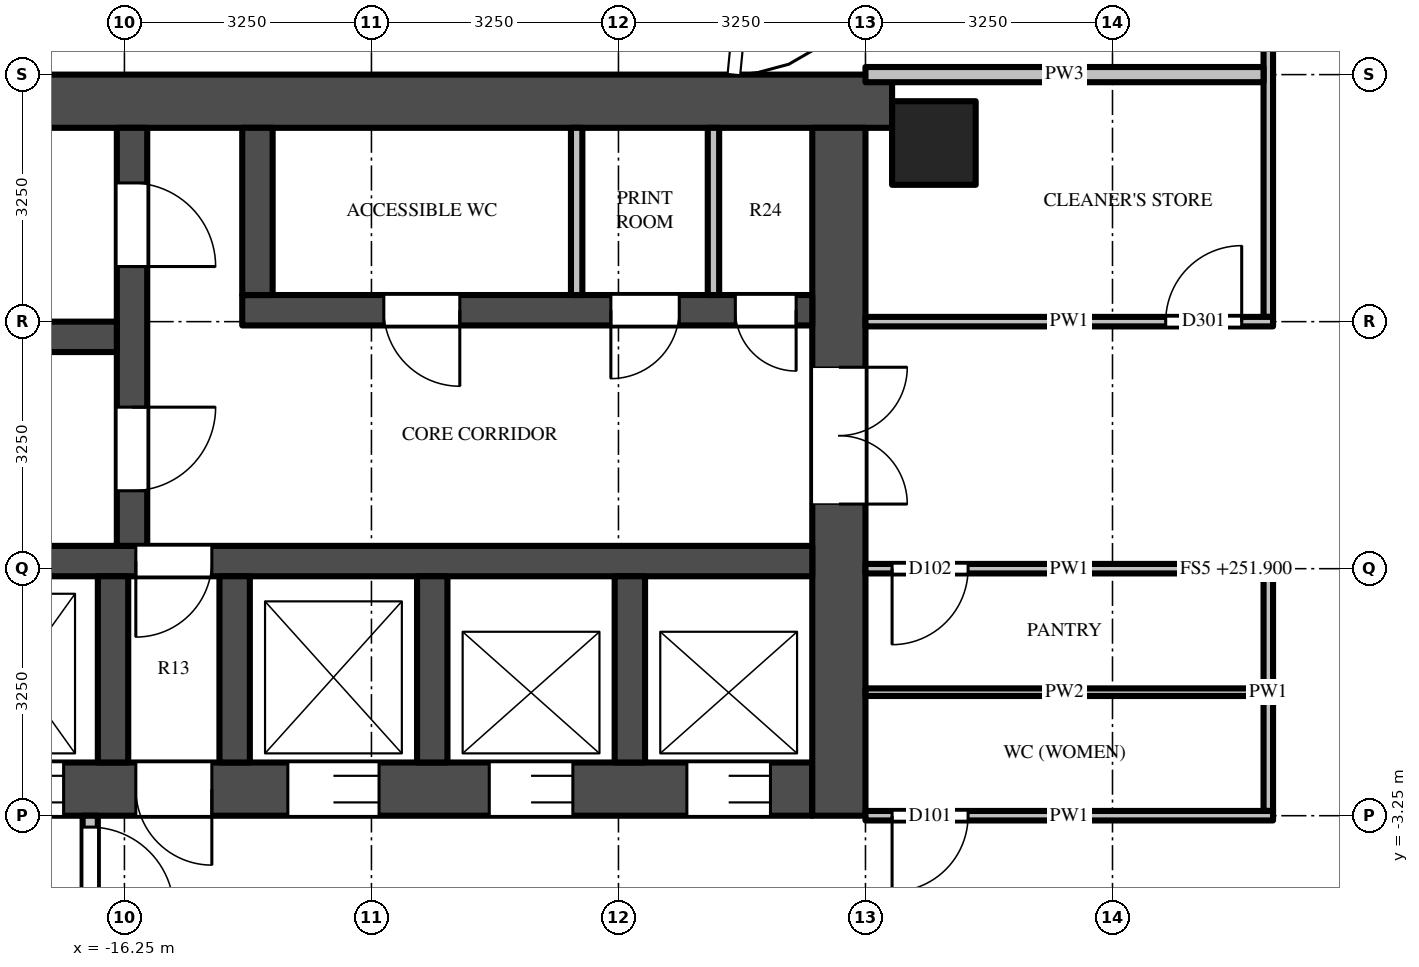
"""IFC4 building model, lengths in metres.
Left out: names, types, materials, properties, quantities, classifications, styles, units other than length and angle.
Written with IfcOpenShell. Run it as: python <this file> out.ifc"""

import sys

from ifc_helpers import new_model, si_unit, direction, frame, frame_2d, origin, origin_2d, place, context, subcontext, project, spatial, rectangle, extrude, source, transform, mapped, element, fill, save


model = new_model("IFC4")
c1 = context("Model", 3, precision=1e-05, world=origin(), true_north=direction((0.0, 1.0)))
c2 = subcontext(c1, "Body", "Model", "MODEL_VIEW")
j1 = project(units=[si_unit("LENGTHUNIT", "METRE"), si_unit("PLANEANGLEUNIT", "RADIAN")], contexts=[c1])
p1 = place(None, origin())
s1 = spatial("IfcSite", under=j1, at=p1, CompositionType="ELEMENT")
p2 = place(p1, origin())
s2 = spatial("IfcBuilding", under=s1, at=p2, CompositionType="ELEMENT")
p3 = place(p2, frame((0.0, 0.0, 251.9)))
s3 = spatial("IfcBuildingStorey", under=s2, at=p3, CompositionType="ELEMENT", Elevation=251.9)
m1 = source(origin(), c2, "Body", "SweptSolid", [
    extrude(rectangle(XDim=1.1, YDim=1.1, at=origin_2d()), origin(), (0.0, 0.0, 1.0), 3.9),
])
p4 = place(p3, frame((-5.6, 5.6, 0.0), z_axis=(0.0, 0.0, 1.0), x_axis=(1.0, 0.0, 0.0)))
e1 = element("IfcColumn", 1, at=p4, inside=s3, PredefinedType="COLUMN", context=c2, shape_type="MappedRepresentation", body=[
    mapped(m1, transform((0.0, 0.0, 0.0))),
])
m2 = source(origin(), c2, "Body", "SweptSolid", [
    extrude(rectangle(XDim=16.6, YDim=0.7, at=frame_2d((8.3, 0.0))), origin(), (0.0, 0.0, 1.0), 3.7),
])
p5 = place(p3, frame((-6.15, 6.15, 0.0), z_axis=(0.0, 0.0, 1.0), x_axis=(-1.0, 0.0, 0.0)))
e2 = element("IfcWall", 2, at=p5, inside=s3, PredefinedType="SHEAR", context=c2, shape_type="MappedRepresentation", body=[
    mapped(m2, transform((0.0, 0.0, 0.0))),
])
m3 = source(origin(), c2, "Body", "SweptSolid", [
    extrude(rectangle(XDim=14.85, YDim=0.7, at=frame_2d((7.425, 0.0))), origin(), (0.0, 0.0, 1.0), 3.7),
])
p6 = place(p3, frame((-7.2, -2.9, 0.0), z_axis=(0.0, 0.0, 1.0), x_axis=(-1.0, 0.0, 0.0)))
e3 = element("IfcWall", 3, at=p6, inside=s3, PredefinedType="SHEAR", context=c2, shape_type="MappedRepresentation", body=[
    mapped(m3, transform((0.0, 0.0, 0.0))),
])
m4 = source(origin(), c2, "Body", "SweptSolid", [
    extrude(rectangle(XDim=1.1, YDim=2.1, at=frame_2d((0.55, 1.05))), frame((0.0, 0.36, 0.0), z_axis=(0.0, -1.0, 0.0), x_axis=(1.0, 0.0, 0.0)), (0.0, 0.0, 1.0), 0.72),
])
p7 = place(p6, frame((0.55, 0.0, 0.0)))
e4 = element("IfcOpeningElement", 4, at=p7, cuts=e3, PredefinedType="OPENING", context=c2, shape_type="MappedRepresentation", body=[
    mapped(m4, transform((0.0, 0.0, 0.0))),
])
p8 = place(p6, frame((3.15, 0.0, 0.0)))
e5 = element("IfcOpeningElement", 5, at=p8, cuts=e3, PredefinedType="OPENING", context=c2, shape_type="MappedRepresentation", body=[
    mapped(m4, transform((0.0, 0.0, 0.0))),
])
m5 = source(origin(), c2, "Body", "SweptSolid", [
    extrude(rectangle(XDim=1.2, YDim=2.1, at=frame_2d((0.6, 1.05))), frame((0.0, 0.36, 0.0), z_axis=(0.0, -1.0, 0.0), x_axis=(1.0, 0.0, 0.0)), (0.0, 0.0, 1.0), 0.72),
])
p9 = place(p6, frame((5.7, 0.0, 0.0)))
e6 = element("IfcOpeningElement", 6, at=p9, cuts=e3, PredefinedType="OPENING", context=c2, shape_type="MappedRepresentation", body=[
    mapped(m5, transform((0.0, 0.0, 0.0))),
])
m6 = source(origin(), c2, "Body", "SweptSolid", [
    extrude(rectangle(XDim=1.3, YDim=2.1, at=frame_2d((0.65, 1.05))), frame((0.0, 0.36, 0.0), z_axis=(0.0, -1.0, 0.0), x_axis=(1.0, 0.0, 0.0)), (0.0, 0.0, 1.0), 0.72),
])
p10 = place(p6, frame((12.2, 0.0, 0.0)))
e7 = element("IfcOpeningElement", 7, at=p10, cuts=e3, PredefinedType="OPENING", context=c2, shape_type="MappedRepresentation", body=[
    mapped(m6, transform((0.0, 0.0, 0.0))),
])
p11 = place(p6, frame((9.85, 0.0, 0.0)))
e8 = element("IfcOpeningElement", 8, at=p11, cuts=e3, PredefinedType="OPENING", context=c2, shape_type="MappedRepresentation", body=[
    mapped(m5, transform((0.0, 0.0, 0.0))),
])
m7 = source(origin(), c2, "Body", "SweptSolid", [
    extrude(rectangle(XDim=1.0, YDim=2.1, at=frame_2d((0.5, 1.05))), frame((0.0, 0.36, 0.0), z_axis=(0.0, -1.0, 0.0), x_axis=(1.0, 0.0, 0.0)), (0.0, 0.0, 1.0), 0.72),
])
p12 = place(p6, frame((7.9, 0.0, 0.0)))
e9 = element("IfcOpeningElement", 9, at=p12, cuts=e3, PredefinedType="OPENING", context=c2, shape_type="MappedRepresentation", body=[
    mapped(m7, transform((0.0, 0.0, 0.0))),
])
m8 = source(origin(), c2, "Body", "SweptSolid", [
    extrude(rectangle(XDim=9.05, YDim=0.7, at=frame_2d((4.525, 0.0))), origin(), (0.0, 0.0, 1.0), 3.7),
])
p13 = place(p3, frame((-6.85, 5.8, 0.0), z_axis=(0.0, 0.0, 1.0), x_axis=(0.0, -1.0, 0.0)))
e10 = element("IfcWall", 10, at=p13, inside=s3, PredefinedType="SHEAR", context=c2, shape_type="MappedRepresentation", body=[
    mapped(m8, transform((0.0, 0.0, 0.0))),
])
m9 = source(origin(), c2, "Body", "SweptSolid", [
    extrude(rectangle(XDim=1.8, YDim=2.1, at=frame_2d((0.9, 1.05))), frame((0.0, 0.36, 0.0), z_axis=(0.0, -1.0, 0.0), x_axis=(1.0, 0.0, 0.0)), (0.0, 0.0, 1.0), 0.72),
])
p14 = place(p13, frame((3.15, 0.0, 0.0)))
e11 = element("IfcOpeningElement", 11, at=p14, cuts=e10, PredefinedType="OPENING", context=c2, shape_type="MappedRepresentation", body=[
    mapped(m9, transform((0.0, 0.0, 0.0))),
])
m10 = source(origin(), c2, "Body", "SweptSolid", [
    extrude(rectangle(XDim=7.5, YDim=0.4, at=frame_2d((3.75, 0.0))), origin(), (0.0, 0.0, 1.0), 3.7),
])
p15 = place(p3, frame((-7.2, 3.4, 0.0), z_axis=(0.0, 0.0, 1.0), x_axis=(-1.0, 0.0, 0.0)))
e12 = element("IfcWall", 12, at=p15, inside=s3, PredefinedType="SHEAR", context=c2, shape_type="MappedRepresentation", body=[
    mapped(m10, transform((0.0, 0.0, 0.0))),
])
m11 = source(origin(), c2, "Body", "SweptSolid", [
    extrude(rectangle(XDim=0.8, YDim=2.1, at=frame_2d((0.4, 1.05))), frame((0.0, 0.21, 0.0), z_axis=(0.0, -1.0, 0.0), x_axis=(1.0, 0.0, 0.0)), (0.0, 0.0, 1.0), 0.42),
])
p16 = place(p15, frame((0.212, 0.0, 0.0)))
e13 = element("IfcOpeningElement", 13, at=p16, cuts=e12, PredefinedType="OPENING", context=c2, shape_type="MappedRepresentation", body=[
    mapped(m11, transform((0.0, 0.0, 0.0))),
])
m12 = source(origin(), c2, "Body", "SweptSolid", [
    extrude(rectangle(XDim=0.9, YDim=2.1, at=frame_2d((0.45, 1.05))), frame((0.0, 0.21, 0.0), z_axis=(0.0, -1.0, 0.0), x_axis=(1.0, 0.0, 0.0)), (0.0, 0.0, 1.0), 0.42),
])
p17 = place(p15, frame((1.75, 0.0, 0.0)))
e14 = element("IfcOpeningElement", 14, at=p17, cuts=e12, PredefinedType="OPENING", context=c2, shape_type="MappedRepresentation", body=[
    mapped(m12, transform((0.0, 0.0, 0.0))),
])
m13 = source(origin(), c2, "Body", "SweptSolid", [
    extrude(rectangle(XDim=1.0, YDim=2.1, at=frame_2d((0.5, 1.05))), frame((0.0, 0.21, 0.0), z_axis=(0.0, -1.0, 0.0), x_axis=(1.0, 0.0, 0.0)), (0.0, 0.0, 1.0), 0.42),
])
p18 = place(p15, frame((4.637, 0.0, 0.0)))
e15 = element("IfcOpeningElement", 15, at=p18, cuts=e12, PredefinedType="OPENING", context=c2, shape_type="MappedRepresentation", body=[
    mapped(m13, transform((0.0, 0.0, 0.0))),
])
m14 = source(origin(), c2, "Body", "SweptSolid", [
    extrude(rectangle(XDim=14.85, YDim=0.4, at=frame_2d((7.425, 0.0))), origin(), (0.0, 0.0, 1.0), 3.7),
])
p19 = place(p3, frame((-7.2, 0.1, 0.0), z_axis=(0.0, 0.0, 1.0), x_axis=(-1.0, 0.0, 0.0)))
e16 = element("IfcWall", 16, at=p19, inside=s3, PredefinedType="SHEAR", context=c2, shape_type="MappedRepresentation", body=[
    mapped(m14, transform((0.0, 0.0, 0.0))),
])
p20 = place(p19, frame((7.9, 0.0, 0.0)))
e17 = element("IfcOpeningElement", 17, at=p20, cuts=e16, PredefinedType="OPENING", context=c2, shape_type="MappedRepresentation", body=[
    mapped(m13, transform((0.0, 0.0, 0.0))),
])
m15 = source(origin(), c2, "Body", "SweptSolid", [
    extrude(rectangle(XDim=5.5, YDim=0.4, at=frame_2d((2.75, 0.0))), origin(), (0.0, 0.0, 1.0), 3.7),
])
p21 = place(p3, frame((-16.15, 5.8, 0.0), z_axis=(0.0, 0.0, 1.0), x_axis=(0.0, -1.0, 0.0)))
e18 = element("IfcWall", 18, at=p21, inside=s3, PredefinedType="SHEAR", context=c2, shape_type="MappedRepresentation", body=[
    mapped(m15, transform((0.0, 0.0, 0.0))),
])
m16 = source(origin(), c2, "Body", "SweptSolid", [
    extrude(rectangle(XDim=1.1, YDim=2.1, at=frame_2d((0.55, 1.05))), frame((0.0, 0.21, 0.0), z_axis=(0.0, -1.0, 0.0), x_axis=(1.0, 0.0, 0.0)), (0.0, 0.0, 1.0), 0.42),
])
p22 = place(p21, frame((0.725, 0.0, 0.0)))
e19 = element("IfcOpeningElement", 19, at=p22, cuts=e18, PredefinedType="OPENING", context=c2, shape_type="MappedRepresentation", body=[
    mapped(m16, transform((0.0, 0.0, 0.0))),
])
p23 = place(p21, frame((3.675, 0.0, 0.0)))
e20 = element("IfcOpeningElement", 20, at=p23, cuts=e18, PredefinedType="OPENING", context=c2, shape_type="MappedRepresentation", body=[
    mapped(m16, transform((0.0, 0.0, 0.0))),
])
m17 = source(origin(), c2, "Body", "SweptSolid", [
    extrude(rectangle(XDim=5.7, YDim=0.4, at=frame_2d((2.85, 0.0))), origin(), (0.0, 0.0, 1.0), 3.7),
])
p24 = place(p3, frame((-16.35, 3.05, 0.0), z_axis=(0.0, 0.0, 1.0), x_axis=(-1.0, 0.0, 0.0)))
e21 = element("IfcWall", 21, at=p24, inside=s3, PredefinedType="SHEAR", context=c2, shape_type="MappedRepresentation", body=[
    mapped(m17, transform((0.0, 0.0, 0.0))),
])
m18 = source(origin(), c2, "Body", "SweptSolid", [
    extrude(rectangle(XDim=2.2, YDim=0.4, at=frame_2d((1.1, 0.0))), origin(), (0.0, 0.0, 1.0), 3.7),
])
p25 = place(p3, frame((-14.5, 5.8, 0.0), z_axis=(0.0, 0.0, 1.0), x_axis=(0.0, -1.0, 0.0)))
e22 = element("IfcWall", 22, at=p25, inside=s3, PredefinedType="SHEAR", context=c2, shape_type="MappedRepresentation", body=[
    mapped(m18, transform((0.0, 0.0, 0.0))),
])
m19 = source(origin(), c2, "Body", "SweptSolid", [
    extrude(rectangle(XDim=2.45, YDim=0.4, at=frame_2d((1.225, 0.0))), origin(), (0.0, 0.0, 1.0), 3.7),
])
for number, where, z_axis, x_axis in (
    (23, (-9.6, -0.1, 0.0), (0.0, 0.0, 1.0), (0.0, -1.0, 0.0)),
    (24, (-12.2, -0.1, 0.0), (0.0, 0.0, 1.0), (0.0, -1.0, 0.0)),
    (25, (-14.8, -0.1, 0.0), (0.0, 0.0, 1.0), (0.0, -1.0, 0.0)),
    (26, (-16.4, -0.1, 0.0), (0.0, 0.0, 1.0), (0.0, -1.0, 0.0)),
):
    element("IfcWall", number, at=place(p3, frame(where, z_axis=z_axis, x_axis=x_axis)), inside=s3, PredefinedType="SHEAR", context=c2, shape_type="MappedRepresentation", body=[
        mapped(m19, transform((0.0, 0.0, 0.0))),
    ])
m20 = source(origin(), c2, "Body", "SweptSolid", [
    extrude(rectangle(XDim=3.25, YDim=0.2, at=frame_2d((1.625, 0.0))), origin(), (0.0, 0.0, 1.0), 3.7),
])
p26 = place(p3, frame((-16.7, -3.25, 0.0), z_axis=(0.0, 0.0, 1.0), x_axis=(0.0, -1.0, 0.0)))
e27 = element("IfcWall", 27, at=p26, inside=s3, PredefinedType="PARTITIONING", context=c2, shape_type="MappedRepresentation", body=[
    mapped(m20, transform((0.0, 0.0, 0.0))),
])
m21 = source(origin(), c2, "Body", "SweptSolid", [
    extrude(rectangle(XDim=1.1, YDim=2.1, at=frame_2d((0.55, 1.05))), frame((0.0, 0.11, 0.0), z_axis=(0.0, -1.0, 0.0), x_axis=(1.0, 0.0, 0.0)), (0.0, 0.0, 1.0), 0.22),
])
p27 = place(p26, frame((0.15, 0.0, 0.0)))
e28 = element("IfcOpeningElement", 28, at=p27, cuts=e27, PredefinedType="OPENING", context=c2, shape_type="MappedRepresentation", body=[
    mapped(m21, transform((0.0, 0.0, 0.0))),
])
m22 = source(origin(), c2, "Body", "SweptSolid", [
    extrude(rectangle(XDim=2.2, YDim=0.15, at=frame_2d((1.1, 0.0))), origin(), (0.0, 0.0, 1.0), 3.7),
])
for number, where, z_axis, x_axis in (
    (29, (-8.5, 5.8, 0.0), (0.0, 0.0, 1.0), (0.0, -1.0, 0.0)),
    (30, (-10.3, 5.8, 0.0), (0.0, 0.0, 1.0), (0.0, -1.0, 0.0)),
):
    element("IfcWall", number, at=place(p3, frame(where, z_axis=z_axis, x_axis=x_axis)), inside=s3, PredefinedType="PARTITIONING", context=c2, shape_type="MappedRepresentation", body=[
        mapped(m22, transform((0.0, 0.0, 0.0))),
    ])
m23 = source(origin(), c2, "Body", "SweptSolid", [
    extrude(rectangle(XDim=3.125, YDim=0.125, at=frame_2d((1.562, 0.0))), origin(), (0.0, 0.0, 1.0), 3.068),
])
p28 = place(p3, frame((-1.2, -0.062, 0.0), z_axis=(0.0, 0.0, 1.0), x_axis=(0.0, -1.0, 0.0)))
e31 = element("IfcWall", 31, at=p28, inside=s3, PredefinedType="PARTITIONING", context=c2, shape_type="MappedRepresentation", body=[
    mapped(m23, transform((0.0, 0.0, 0.0))),
])
m24 = source(origin(), c2, "Body", "SweptSolid", [
    extrude(rectangle(XDim=8.725, YDim=0.125, at=frame_2d((4.363, 0.0))), origin(), (0.0, 0.0, 1.0), 2.997),
])
p29 = place(p3, frame((-1.2, 12.038, 0.0), z_axis=(0.0, 0.0, 1.0), x_axis=(0.0, -1.0, 0.0)))
e32 = element("IfcWall", 32, at=p29, inside=s3, PredefinedType="PARTITIONING", context=c2, shape_type="MappedRepresentation", body=[
    mapped(m24, transform((0.0, 0.0, 0.0))),
])
m25 = source(origin(), c2, "Body", "SweptSolid", [
    extrude(rectangle(XDim=1.0, YDim=2.1, at=frame_2d((0.5, 1.05))), frame((0.0, 0.073, 0.0), z_axis=(0.0, -1.0, 0.0), x_axis=(1.0, 0.0, 0.0)), (0.0, 0.0, 1.0), 0.145),
])
p30 = place(p29, frame((4.188, 0.0, 0.0)))
e33 = element("IfcOpeningElement", 33, at=p30, cuts=e32, PredefinedType="OPENING", context=c2, shape_type="MappedRepresentation", body=[
    mapped(m25, transform((0.0, 0.0, 0.0))),
])
m26 = source(origin(), c2, "Body", "SweptSolid", [
    extrude(rectangle(XDim=5.363, YDim=0.125, at=frame_2d((2.681, 0.0))), origin(), (0.0, 0.0, 1.0), 2.997),
])
p31 = place(p3, frame((-1.137, -3.25, 0.0), z_axis=(0.0, 0.0, 1.0), x_axis=(-1.0, 0.0, 0.0)))
e34 = element("IfcWall", 34, at=p31, inside=s3, PredefinedType="PARTITIONING", context=c2, shape_type="MappedRepresentation", body=[
    mapped(m26, transform((0.0, 0.0, 0.0))),
])
p32 = place(p31, frame((4.012, 0.0, 0.0)))
e35 = element("IfcOpeningElement", 35, at=p32, cuts=e34, PredefinedType="OPENING", context=c2, shape_type="MappedRepresentation", body=[
    mapped(m25, transform((0.0, 0.0, 0.0))),
])
m27 = source(origin(), c2, "Body", "SweptSolid", [
    extrude(rectangle(XDim=5.238, YDim=0.1, at=frame_2d((2.619, 0.0))), origin(), (0.0, 0.0, 1.0), 2.997),
])
p33 = place(p3, frame((-6.5, -1.625, 0.0), z_axis=(0.0, 0.0, 1.0), x_axis=(1.0, 0.0, 0.0)))
e36 = element("IfcWall", 36, at=p33, inside=s3, PredefinedType="PARTITIONING", context=c2, shape_type="MappedRepresentation", body=[
    mapped(m27, transform((0.0, 0.0, 0.0))),
])
p34 = place(p3, frame((-1.137, 0.0, 0.0), z_axis=(0.0, 0.0, 1.0), x_axis=(-1.0, 0.0, 0.0)))
e37 = element("IfcWall", 37, at=p34, inside=s3, PredefinedType="PARTITIONING", context=c2, shape_type="MappedRepresentation", body=[
    mapped(m26, transform((0.0, 0.0, 0.0))),
])
p35 = place(p34, frame((4.012, 0.0, 0.0)))
e38 = element("IfcOpeningElement", 38, at=p35, cuts=e37, PredefinedType="OPENING", context=c2, shape_type="MappedRepresentation", body=[
    mapped(m25, transform((0.0, 0.0, 0.0))),
])
p36 = place(p3, frame((-6.5, 3.25, 0.0), z_axis=(0.0, 0.0, 1.0), x_axis=(1.0, 0.0, 0.0)))
e39 = element("IfcWall", 39, at=p36, inside=s3, PredefinedType="PARTITIONING", context=c2, shape_type="MappedRepresentation", body=[
    mapped(m26, transform((0.0, 0.0, 0.0))),
])
p37 = place(p36, frame((3.95, 0.0, 0.0)))
e40 = element("IfcOpeningElement", 40, at=p37, cuts=e39, PredefinedType="OPENING", context=c2, shape_type="MappedRepresentation", body=[
    mapped(m25, transform((0.0, 0.0, 0.0))),
])
m28 = source(origin(), c2, "Body", "SweptSolid", [
    extrude(rectangle(XDim=5.238, YDim=0.2, at=frame_2d((2.619, 0.0))), origin(), (0.0, 0.0, 1.0), 2.78),
])
p38 = place(p3, frame((-6.5, 6.5, 0.0), z_axis=(0.0, 0.0, 1.0), x_axis=(1.0, 0.0, 0.0)))
e41 = element("IfcWall", 41, at=p38, inside=s3, PredefinedType="PARTITIONING", context=c2, shape_type="MappedRepresentation", body=[
    mapped(m28, transform((0.0, 0.0, 0.0))),
])
m29 = source(origin(), c2, "Body", "SweptSolid", [
    extrude(rectangle(XDim=1.1, YDim=2.1, at=frame_2d((0.55, 1.05))), frame((0.0, -0.275, 0.0), z_axis=(0.0, -1.0, 0.0), x_axis=(1.0, 0.0, 0.0)), (0.0, 0.0, 1.0), 0.05),
])
p39 = place(p7, origin())
e42 = element("IfcDoor", 42, at=p39, inside=s3, OperationType="DOUBLE_DOOR_SLIDING", PredefinedType="DOOR", context=c2, shape_type="MappedRepresentation", body=[
    mapped(m29, transform((0.0, 0.0, 0.0))),
])
fill(e4, e42)
p40 = place(p8, origin())
e43 = element("IfcDoor", 43, at=p40, inside=s3, OperationType="DOUBLE_DOOR_SLIDING", PredefinedType="DOOR", context=c2, shape_type="MappedRepresentation", body=[
    mapped(m29, transform((0.0, 0.0, 0.0))),
])
fill(e5, e43)
m30 = source(origin(), c2, "Body", "SweptSolid", [
    extrude(rectangle(XDim=1.2, YDim=2.1, at=frame_2d((0.6, 1.05))), frame((0.0, -0.275, 0.0), z_axis=(0.0, -1.0, 0.0), x_axis=(1.0, 0.0, 0.0)), (0.0, 0.0, 1.0), 0.05),
])
p41 = place(p9, origin())
e44 = element("IfcDoor", 44, at=p41, inside=s3, OperationType="DOUBLE_DOOR_SLIDING", PredefinedType="DOOR", context=c2, shape_type="MappedRepresentation", body=[
    mapped(m30, transform((0.0, 0.0, 0.0))),
])
fill(e6, e44)
p42 = place(p11, origin())
e45 = element("IfcDoor", 45, at=p42, inside=s3, OperationType="DOUBLE_DOOR_SLIDING", PredefinedType="DOOR", context=c2, shape_type="MappedRepresentation", body=[
    mapped(m30, transform((0.0, 0.0, 0.0))),
])
fill(e8, e45)
m31 = source(origin(), c2, "Body", "SweptSolid", [
    extrude(rectangle(XDim=1.8, YDim=2.1, at=frame_2d((0.9, 1.05))), frame((0.0, -0.275, 0.0), z_axis=(0.0, -1.0, 0.0), x_axis=(1.0, 0.0, 0.0)), (0.0, 0.0, 1.0), 0.05),
])
p43 = place(p14, origin())
e46 = element("IfcDoor", 46, at=p43, inside=s3, OperationType="DOUBLE_DOOR_SINGLE_SWING", PredefinedType="DOOR", context=c2, shape_type="MappedRepresentation", body=[
    mapped(m31, transform((0.0, 0.0, 0.0))),
])
fill(e11, e46)
m32 = source(origin(), c2, "Body", "SweptSolid", [
    extrude(rectangle(XDim=1.1, YDim=2.1, at=frame_2d((0.55, 1.05))), frame((0.0, 0.025, 0.0), z_axis=(0.0, -1.0, 0.0), x_axis=(1.0, 0.0, 0.0)), (0.0, 0.0, 1.0), 0.05),
])
p44 = place(p22, origin())
e47 = element("IfcDoor", 47, at=p44, inside=s3, OperationType="SINGLE_SWING_RIGHT", PredefinedType="DOOR", context=c2, shape_type="MappedRepresentation", body=[
    mapped(m32, transform((0.0, 0.0, 0.0))),
])
fill(e19, e47)
p45 = place(p23, origin())
e48 = element("IfcDoor", 48, at=p45, inside=s3, OperationType="SINGLE_SWING_LEFT", PredefinedType="DOOR", context=c2, shape_type="MappedRepresentation", body=[
    mapped(m32, transform((0.0, 0.0, 0.0))),
])
fill(e20, e48)
m33 = source(origin(), c2, "Body", "SweptSolid", [
    extrude(rectangle(XDim=1.0, YDim=2.1, at=frame_2d((0.5, 1.05))), frame((0.0, 0.025, 0.0), z_axis=(0.0, -1.0, 0.0), x_axis=(1.0, 0.0, 0.0)), (0.0, 0.0, 1.0), 0.05),
])
p46 = place(p20, origin())
e49 = element("IfcDoor", 49, at=p46, inside=s3, OperationType="SINGLE_SWING_RIGHT", PredefinedType="DOOR", context=c2, shape_type="MappedRepresentation", body=[
    mapped(m33, transform((0.0, 0.0, 0.0))),
])
fill(e17, e49)
m34 = source(origin(), c2, "Body", "SweptSolid", [
    extrude(rectangle(XDim=1.0, YDim=2.1, at=frame_2d((0.5, 1.05))), frame((0.0, -0.275, 0.0), z_axis=(0.0, -1.0, 0.0), x_axis=(1.0, 0.0, 0.0)), (0.0, 0.0, 1.0), 0.05),
])
p47 = place(p12, origin())
e50 = element("IfcDoor", 50, at=p47, inside=s3, OperationType="SINGLE_SWING_LEFT", PredefinedType="DOOR", context=c2, shape_type="MappedRepresentation", body=[
    mapped(m34, transform((0.0, 0.0, 0.0))),
])
fill(e9, e50)
p48 = place(p27, origin())
e51 = element("IfcDoor", 51, at=p48, inside=s3, OperationType="SINGLE_SWING_RIGHT", PredefinedType="DOOR", context=c2, shape_type="MappedRepresentation", body=[
    mapped(m32, transform((0.0, 0.0, 0.0))),
])
fill(e28, e51)
m35 = source(origin(), c2, "Body", "SweptSolid", [
    extrude(rectangle(XDim=0.8, YDim=2.1, at=frame_2d((0.4, 1.05))), frame((0.0, 0.025, 0.0), z_axis=(0.0, -1.0, 0.0), x_axis=(1.0, 0.0, 0.0)), (0.0, 0.0, 1.0), 0.05),
])
p49 = place(p16, origin())
e52 = element("IfcDoor", 52, at=p49, inside=s3, OperationType="SINGLE_SWING_LEFT", PredefinedType="DOOR", context=c2, shape_type="MappedRepresentation", body=[
    mapped(m35, transform((0.0, 0.0, 0.0))),
])
fill(e13, e52)
m36 = source(origin(), c2, "Body", "SweptSolid", [
    extrude(rectangle(XDim=0.9, YDim=2.1, at=frame_2d((0.45, 1.05))), frame((0.0, 0.025, 0.0), z_axis=(0.0, -1.0, 0.0), x_axis=(1.0, 0.0, 0.0)), (0.0, 0.0, 1.0), 0.05),
])
p50 = place(p17, origin())
e53 = element("IfcDoor", 53, at=p50, inside=s3, OperationType="SINGLE_SWING_RIGHT", PredefinedType="DOOR", context=c2, shape_type="MappedRepresentation", body=[
    mapped(m36, transform((0.0, 0.0, 0.0))),
])
fill(e14, e53)
p51 = place(p18, origin())
e54 = element("IfcDoor", 54, at=p51, inside=s3, OperationType="SINGLE_SWING_LEFT", PredefinedType="DOOR", context=c2, shape_type="MappedRepresentation", body=[
    mapped(m33, transform((0.0, 0.0, 0.0))),
])
fill(e15, e54)
p52 = place(p32, origin())
e55 = element("IfcDoor", 55, at=p52, inside=s3, OperationType="SINGLE_SWING_RIGHT", PredefinedType="DOOR", context=c2, shape_type="MappedRepresentation", body=[
    mapped(m33, transform((0.0, 0.0, 0.0))),
])
fill(e35, e55)
p53 = place(p35, origin())
e56 = element("IfcDoor", 56, at=p53, inside=s3, OperationType="SINGLE_SWING_RIGHT", PredefinedType="DOOR", context=c2, shape_type="MappedRepresentation", body=[
    mapped(m33, transform((0.0, 0.0, 0.0))),
])
fill(e38, e56)
p54 = place(p37, origin())
e57 = element("IfcDoor", 57, at=p54, inside=s3, OperationType="SINGLE_SWING_RIGHT", PredefinedType="DOOR", context=c2, shape_type="MappedRepresentation", body=[
    mapped(m33, transform((0.0, 0.0, 0.0))),
])
fill(e40, e57)
save(model, sys.argv[1])
